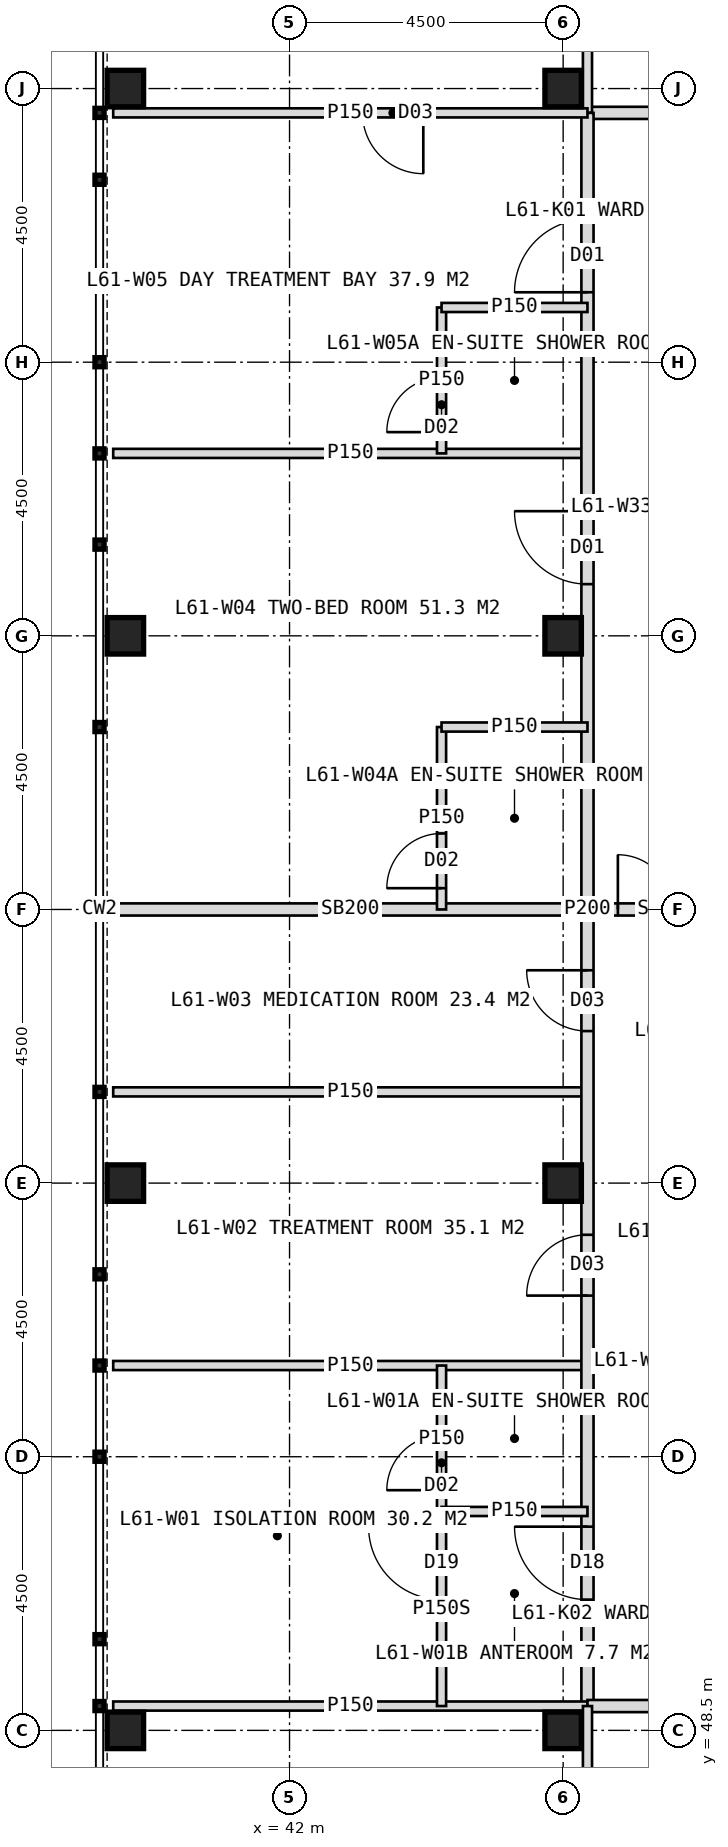
"""IFC4 building model, lengths in metres.
Left out: names, types, materials, properties, quantities, classifications, styles, units other than length and angle.
Written with IfcOpenShell. Run it as: python <this file> out.ifc"""

import sys

from ifc_helpers import new_model, si_unit, direction, frame, frame_2d, origin, origin_2d, place, context, subcontext, project, spatial, rectangle, hollow_rectangle, extrude, element, fill, save


model = new_model("IFC4")
c1 = context("Model", 3, precision=1e-05, world=origin(), true_north=direction((0.0, 1.0)))
c2 = subcontext(c1, "Body", "Model", "MODEL_VIEW")
j1 = project(units=[si_unit("LENGTHUNIT", "METRE"), si_unit("PLANEANGLEUNIT", "RADIAN")], contexts=[c1])
p1 = place(None, origin())
s1 = spatial("IfcSite", under=j1, at=p1, CompositionType="ELEMENT")
p2 = place(p1, origin())
s2 = spatial("IfcBuilding", under=s1, at=p2, CompositionType="ELEMENT")
p3 = place(p2, frame((0.0, 0.0, 254.0)))
s3 = spatial("IfcBuildingStorey", under=s2, at=p3, CompositionType="ELEMENT", Elevation=254.0)
for number, where, z_axis, x_axis in (
    (1, (46.5, 48.5, 0.0), (0.0, 0.0, 1.0), (1.0, 0.0, 0.0)),
    (2, (46.5, 75.5, 0.0), (0.0, 0.0, 1.0), (1.0, 0.0, 0.0)),
    (3, (46.5, 57.5, 0.0), (0.0, 0.0, 1.0), (1.0, 0.0, 0.0)),
    (4, (46.5, 66.5, 0.0), (0.0, 0.0, 1.0), (1.0, 0.0, 0.0)),
    (5, (39.3, 48.5, 0.0), (0.0, 0.0, 1.0), (1.0, 0.0, 0.0)),
    (6, (39.3, 57.5, 0.0), (0.0, 0.0, 1.0), (1.0, 0.0, 0.0)),
    (7, (39.3, 66.5, 0.0), (0.0, 0.0, 1.0), (1.0, 0.0, 0.0)),
    (8, (39.3, 75.5, 0.0), (0.0, 0.0, 1.0), (1.0, 0.0, 0.0)),
):
    element("IfcColumn", number, at=place(p3, frame(where, z_axis=z_axis, x_axis=x_axis)), inside=s3, PredefinedType="COLUMN", context=c2, shape_type="SweptSolid", body=[
        extrude(hollow_rectangle(XDim=0.6, YDim=0.6, WallThickness=0.04, at=origin_2d()), origin(), (0.0, 0.0, 1.0), 4.0),
    ])
p4 = place(p3, frame((46.9, 75.1, 0.0), z_axis=(0.0, 0.0, 1.0), x_axis=(1.0, 0.0, 0.0)))
e9 = element("IfcWall", 9, at=p4, inside=s3, PredefinedType="PARTITIONING", context=c2, shape_type="SweptSolid", body=[
    extrude(rectangle(XDim=26.2, YDim=0.2, at=frame_2d((13.1, 0.0))), origin(), (0.0, 0.0, 1.0), 3.75),
])
p5 = place(p4, frame((1.75, 0.0, 0.0)))
e10 = element("IfcOpeningElement", 10, at=p5, cuts=e9, PredefinedType="OPENING", context=c2, shape_type="SweptSolid", body=[
    extrude(rectangle(XDim=1.2, YDim=2.2, at=frame_2d((0.6, 1.1))), frame((0.0, 0.11, 0.0), z_axis=(0.0, -1.0, 0.0), x_axis=(1.0, 0.0, 0.0)), (0.0, 0.0, 1.0), 0.22),
])
p6 = place(p4, frame((6.75, 0.0, 0.0)))
e11 = element("IfcOpeningElement", 11, at=p6, cuts=e9, PredefinedType="OPENING", context=c2, shape_type="SweptSolid", body=[
    extrude(rectangle(XDim=1.0, YDim=2.1, at=frame_2d((0.5, 1.05))), frame((0.0, 0.11, 0.0), z_axis=(0.0, -1.0, 0.0), x_axis=(1.0, 0.0, 0.0)), (0.0, 0.0, 1.0), 0.22),
])
p7 = place(p4, frame((12.75, 0.0, 0.0)))
e12 = element("IfcOpeningElement", 12, at=p7, cuts=e9, PredefinedType="OPENING", context=c2, shape_type="SweptSolid", body=[
    extrude(rectangle(XDim=1.2, YDim=2.2, at=frame_2d((0.6, 1.1))), frame((0.0, 0.11, 0.0), z_axis=(0.0, -1.0, 0.0), x_axis=(1.0, 0.0, 0.0)), (0.0, 0.0, 1.0), 0.22),
])
p8 = place(p4, frame((20.45, 0.0, 0.0)))
e13 = element("IfcOpeningElement", 13, at=p8, cuts=e9, PredefinedType="OPENING", context=c2, shape_type="SweptSolid", body=[
    extrude(rectangle(XDim=0.9, YDim=2.1, at=frame_2d((0.45, 1.05))), frame((0.0, 0.11, 0.0), z_axis=(0.0, -1.0, 0.0), x_axis=(1.0, 0.0, 0.0)), (0.0, 0.0, 1.0), 0.22),
])
p9 = place(p4, frame((18.45, 0.0, 0.0)))
e14 = element("IfcOpeningElement", 14, at=p9, cuts=e9, PredefinedType="OPENING", context=c2, shape_type="SweptSolid", body=[
    extrude(rectangle(XDim=1.0, YDim=2.1, at=frame_2d((0.5, 1.05))), frame((0.0, 0.11, 0.0), z_axis=(0.0, -1.0, 0.0), x_axis=(1.0, 0.0, 0.0)), (0.0, 0.0, 1.0), 0.22),
])
p10 = place(p4, frame((23.65, 0.0, 0.0)))
e15 = element("IfcOpeningElement", 15, at=p10, cuts=e9, PredefinedType="OPENING", context=c2, shape_type="SweptSolid", body=[
    extrude(rectangle(XDim=1.0, YDim=2.1, at=frame_2d((0.5, 1.05))), frame((0.0, 0.11, 0.0), z_axis=(0.0, -1.0, 0.0), x_axis=(1.0, 0.0, 0.0)), (0.0, 0.0, 1.0), 0.22),
])
for number, where, z_axis, x_axis in (
    (16, (46.9, 75.1, 0.0), (0.0, 0.0, 1.0), (0.0, 1.0, 0.0)),
    (17, (46.9, 54.5, 0.0), (0.0, 0.0, 1.0), (-1.0, 0.0, 0.0)),
    (18, (46.9, 59.0, 0.0), (0.0, 0.0, 1.0), (-1.0, 0.0, 0.0)),
):
    element("IfcWall", number, at=place(p3, frame(where, z_axis=z_axis, x_axis=x_axis)), inside=s3, PredefinedType="PARTITIONING", context=c2, shape_type="SweptSolid", body=[
        extrude(rectangle(XDim=7.8, YDim=0.15, at=frame_2d((3.9, 0.0))), origin(), (0.0, 0.0, 1.0), 3.75),
    ])
p11 = place(p3, frame((46.9, 62.0, 0.0), z_axis=(0.0, 0.0, 1.0), x_axis=(-1.0, 0.0, 0.0)))
e19 = element("IfcWall", 19, at=p11, inside=s3, PredefinedType="SOLIDWALL", context=c2, shape_type="SweptSolid", body=[
    extrude(rectangle(XDim=7.8, YDim=0.2, at=frame_2d((3.9, 0.0))), origin(), (0.0, 0.0, 1.0), 2.75),
])
p12 = place(p3, frame((46.9, 69.5, 0.0), z_axis=(0.0, 0.0, 1.0), x_axis=(-1.0, 0.0, 0.0)))
e20 = element("IfcWall", 20, at=p12, inside=s3, PredefinedType="PARTITIONING", context=c2, shape_type="SweptSolid", body=[
    extrude(rectangle(XDim=7.8, YDim=0.15, at=frame_2d((3.9, 0.0))), origin(), (0.0, 0.0, 1.0), 3.75),
])
p13 = place(p3, frame((46.9, 48.9, 0.0), z_axis=(0.0, 0.0, 1.0), x_axis=(0.0, 1.0, 0.0)))
e21 = element("IfcWall", 21, at=p13, inside=s3, PredefinedType="PARTITIONING", context=c2, shape_type="SweptSolid", body=[
    extrude(rectangle(XDim=26.2, YDim=0.2, at=frame_2d((13.1, 0.0))), origin(), (0.0, 0.0, 1.0), 3.75),
])
p14 = place(p13, frame((1.75, 0.0, 0.0)))
e22 = element("IfcOpeningElement", 22, at=p14, cuts=e21, PredefinedType="OPENING", context=c2, shape_type="SweptSolid", body=[
    extrude(rectangle(XDim=1.2, YDim=2.2, at=frame_2d((0.6, 1.1))), frame((0.0, 0.11, 0.0), z_axis=(0.0, -1.0, 0.0), x_axis=(1.0, 0.0, 0.0)), (0.0, 0.0, 1.0), 0.22),
])
p15 = place(p13, frame((6.75, 0.0, 0.0)))
e23 = element("IfcOpeningElement", 23, at=p15, cuts=e21, PredefinedType="OPENING", context=c2, shape_type="SweptSolid", body=[
    extrude(rectangle(XDim=1.0, YDim=2.1, at=frame_2d((0.5, 1.05))), frame((0.0, 0.11, 0.0), z_axis=(0.0, -1.0, 0.0), x_axis=(1.0, 0.0, 0.0)), (0.0, 0.0, 1.0), 0.22),
])
p16 = place(p13, frame((11.1, 0.0, 0.0)))
e24 = element("IfcOpeningElement", 24, at=p16, cuts=e21, PredefinedType="OPENING", context=c2, shape_type="SweptSolid", body=[
    extrude(rectangle(XDim=1.0, YDim=2.1, at=frame_2d((0.5, 1.05))), frame((0.0, 0.11, 0.0), z_axis=(0.0, -1.0, 0.0), x_axis=(1.0, 0.0, 0.0)), (0.0, 0.0, 1.0), 0.22),
])
p17 = place(p13, frame((18.45, 0.0, 0.0)))
e25 = element("IfcOpeningElement", 25, at=p17, cuts=e21, PredefinedType="OPENING", context=c2, shape_type="SweptSolid", body=[
    extrude(rectangle(XDim=1.2, YDim=2.2, at=frame_2d((0.6, 1.1))), frame((0.0, 0.11, 0.0), z_axis=(0.0, -1.0, 0.0), x_axis=(1.0, 0.0, 0.0)), (0.0, 0.0, 1.0), 0.22),
])
p18 = place(p13, frame((23.25, 0.0, 0.0)))
e26 = element("IfcOpeningElement", 26, at=p18, cuts=e21, PredefinedType="OPENING", context=c2, shape_type="SweptSolid", body=[
    extrude(rectangle(XDim=1.2, YDim=2.2, at=frame_2d((0.6, 1.1))), frame((0.0, 0.11, 0.0), z_axis=(0.0, -1.0, 0.0), x_axis=(1.0, 0.0, 0.0)), (0.0, 0.0, 1.0), 0.22),
])
p19 = place(p3, frame((46.9, 48.9, 0.0), z_axis=(0.0, 0.0, 1.0), x_axis=(-1.0, 0.0, 0.0)))
e27 = element("IfcWall", 27, at=p19, inside=s3, PredefinedType="PARTITIONING", context=c2, shape_type="SweptSolid", body=[
    extrude(rectangle(XDim=7.8, YDim=0.15, at=frame_2d((3.9, 0.0))), origin(), (0.0, 0.0, 1.0), 3.75),
])
p20 = place(p3, frame((44.5, 52.1, 0.0), z_axis=(0.0, 0.0, 1.0), x_axis=(0.0, 1.0, 0.0)))
e28 = element("IfcWall", 28, at=p20, inside=s3, PredefinedType="PARTITIONING", context=c2, shape_type="SweptSolid", body=[
    extrude(rectangle(XDim=2.4, YDim=0.15, at=frame_2d((1.2, 0.0))), origin(), (0.0, 0.0, 1.0), 3.75),
])
p21 = place(p20, frame((0.35, 0.0, 0.0)))
e29 = element("IfcOpeningElement", 29, at=p21, cuts=e28, PredefinedType="OPENING", context=c2, shape_type="SweptSolid", body=[
    extrude(rectangle(XDim=0.9, YDim=2.1, at=frame_2d((0.45, 1.05))), frame((0.0, 0.085, 0.0), z_axis=(0.0, -1.0, 0.0), x_axis=(1.0, 0.0, 0.0)), (0.0, 0.0, 1.0), 0.17),
])
p22 = place(p3, frame((46.9, 52.1, 0.0), z_axis=(0.0, 0.0, 1.0), x_axis=(-1.0, 0.0, 0.0)))
e30 = element("IfcWall", 30, at=p22, inside=s3, PredefinedType="PARTITIONING", context=c2, shape_type="SweptSolid", body=[
    extrude(rectangle(XDim=2.4, YDim=0.15, at=frame_2d((1.2, 0.0))), origin(), (0.0, 0.0, 1.0), 3.75),
])
p23 = place(p3, frame((44.5, 48.9, 0.0), z_axis=(0.0, 0.0, 1.0), x_axis=(0.0, 1.0, 0.0)))
e31 = element("IfcWall", 31, at=p23, inside=s3, PredefinedType="PARTITIONING", context=c2, shape_type="SweptSolid", body=[
    extrude(rectangle(XDim=3.2, YDim=0.15, at=frame_2d((1.6, 0.0))), origin(), (0.0, 0.0, 1.0), 3.75),
])
p24 = place(p23, frame((1.75, 0.0, 0.0)))
e32 = element("IfcOpeningElement", 32, at=p24, cuts=e31, PredefinedType="OPENING", context=c2, shape_type="SweptSolid", body=[
    extrude(rectangle(XDim=1.2, YDim=2.2, at=frame_2d((0.6, 1.1))), frame((0.0, 0.085, 0.0), z_axis=(0.0, -1.0, 0.0), x_axis=(1.0, 0.0, 0.0)), (0.0, 0.0, 1.0), 0.17),
])
p25 = place(p3, frame((44.5, 62.0, 0.0), z_axis=(0.0, 0.0, 1.0), x_axis=(0.0, 1.0, 0.0)))
e33 = element("IfcWall", 33, at=p25, inside=s3, PredefinedType="PARTITIONING", context=c2, shape_type="SweptSolid", body=[
    extrude(rectangle(XDim=3.0, YDim=0.15, at=frame_2d((1.5, 0.0))), origin(), (0.0, 0.0, 1.0), 3.75),
])
p26 = place(p25, frame((0.35, 0.0, 0.0)))
e34 = element("IfcOpeningElement", 34, at=p26, cuts=e33, PredefinedType="OPENING", context=c2, shape_type="SweptSolid", body=[
    extrude(rectangle(XDim=0.9, YDim=2.1, at=frame_2d((0.45, 1.05))), frame((0.0, 0.085, 0.0), z_axis=(0.0, -1.0, 0.0), x_axis=(1.0, 0.0, 0.0)), (0.0, 0.0, 1.0), 0.17),
])
p27 = place(p3, frame((46.9, 65.0, 0.0), z_axis=(0.0, 0.0, 1.0), x_axis=(-1.0, 0.0, 0.0)))
e35 = element("IfcWall", 35, at=p27, inside=s3, PredefinedType="PARTITIONING", context=c2, shape_type="SweptSolid", body=[
    extrude(rectangle(XDim=2.4, YDim=0.15, at=frame_2d((1.2, 0.0))), origin(), (0.0, 0.0, 1.0), 3.75),
])
p28 = place(p3, frame((46.9, 75.1, 0.0), z_axis=(0.0, 0.0, 1.0), x_axis=(-1.0, 0.0, 0.0)))
e36 = element("IfcWall", 36, at=p28, inside=s3, PredefinedType="PARTITIONING", context=c2, shape_type="SweptSolid", body=[
    extrude(rectangle(XDim=7.8, YDim=0.15, at=frame_2d((3.9, 0.0))), origin(), (0.0, 0.0, 1.0), 3.75),
])
p29 = place(p28, frame((2.7, 0.0, 0.0)))
e37 = element("IfcOpeningElement", 37, at=p29, cuts=e36, PredefinedType="OPENING", context=c2, shape_type="SweptSolid", body=[
    extrude(rectangle(XDim=1.0, YDim=2.1, at=frame_2d((0.5, 1.05))), frame((0.0, 0.085, 0.0), z_axis=(0.0, -1.0, 0.0), x_axis=(1.0, 0.0, 0.0)), (0.0, 0.0, 1.0), 0.17),
])
p30 = place(p3, frame((44.5, 69.5, 0.0), z_axis=(0.0, 0.0, 1.0), x_axis=(0.0, 1.0, 0.0)))
e38 = element("IfcWall", 38, at=p30, inside=s3, PredefinedType="PARTITIONING", context=c2, shape_type="SweptSolid", body=[
    extrude(rectangle(XDim=2.4, YDim=0.15, at=frame_2d((1.2, 0.0))), origin(), (0.0, 0.0, 1.0), 3.75),
])
p31 = place(p30, frame((0.35, 0.0, 0.0)))
e39 = element("IfcOpeningElement", 39, at=p31, cuts=e38, PredefinedType="OPENING", context=c2, shape_type="SweptSolid", body=[
    extrude(rectangle(XDim=0.9, YDim=2.1, at=frame_2d((0.45, 1.05))), frame((0.0, 0.085, 0.0), z_axis=(0.0, -1.0, 0.0), x_axis=(1.0, 0.0, 0.0)), (0.0, 0.0, 1.0), 0.17),
])
p32 = place(p3, frame((46.9, 71.9, 0.0), z_axis=(0.0, 0.0, 1.0), x_axis=(-1.0, 0.0, 0.0)))
e40 = element("IfcWall", 40, at=p32, inside=s3, PredefinedType="PARTITIONING", context=c2, shape_type="SweptSolid", body=[
    extrude(rectangle(XDim=2.4, YDim=0.15, at=frame_2d((1.2, 0.0))), origin(), (0.0, 0.0, 1.0), 3.75),
])
p33 = place(p3, frame((73.1, 48.9, 0.0), z_axis=(0.0, 0.0, 1.0), x_axis=(-1.0, 0.0, 0.0)))
e41 = element("IfcWall", 41, at=p33, inside=s3, PredefinedType="PARTITIONING", context=c2, shape_type="SweptSolid", body=[
    extrude(rectangle(XDim=26.2, YDim=0.2, at=frame_2d((13.1, 0.0))), origin(), (0.0, 0.0, 1.0), 3.75),
])
p34 = place(p33, frame((1.75, 0.0, 0.0)))
e42 = element("IfcOpeningElement", 42, at=p34, cuts=e41, PredefinedType="OPENING", context=c2, shape_type="SweptSolid", body=[
    extrude(rectangle(XDim=1.2, YDim=2.2, at=frame_2d((0.6, 1.1))), frame((0.0, 0.11, 0.0), z_axis=(0.0, -1.0, 0.0), x_axis=(1.0, 0.0, 0.0)), (0.0, 0.0, 1.0), 0.22),
])
p35 = place(p33, frame((6.75, 0.0, 0.0)))
e43 = element("IfcOpeningElement", 43, at=p35, cuts=e41, PredefinedType="OPENING", context=c2, shape_type="SweptSolid", body=[
    extrude(rectangle(XDim=1.0, YDim=2.1, at=frame_2d((0.5, 1.05))), frame((0.0, 0.11, 0.0), z_axis=(0.0, -1.0, 0.0), x_axis=(1.0, 0.0, 0.0)), (0.0, 0.0, 1.0), 0.22),
])
p36 = place(p33, frame((11.1, 0.0, 0.0)))
e44 = element("IfcOpeningElement", 44, at=p36, cuts=e41, PredefinedType="OPENING", context=c2, shape_type="SweptSolid", body=[
    extrude(rectangle(XDim=1.0, YDim=2.1, at=frame_2d((0.5, 1.05))), frame((0.0, 0.11, 0.0), z_axis=(0.0, -1.0, 0.0), x_axis=(1.0, 0.0, 0.0)), (0.0, 0.0, 1.0), 0.22),
])
p37 = place(p33, frame((14.1, 0.0, 0.0)))
e45 = element("IfcOpeningElement", 45, at=p37, cuts=e41, PredefinedType="OPENING", context=c2, shape_type="SweptSolid", body=[
    extrude(rectangle(XDim=1.0, YDim=2.1, at=frame_2d((0.5, 1.05))), frame((0.0, 0.11, 0.0), z_axis=(0.0, -1.0, 0.0), x_axis=(1.0, 0.0, 0.0)), (0.0, 0.0, 1.0), 0.22),
])
p38 = place(p33, frame((18.45, 0.0, 0.0)))
e46 = element("IfcOpeningElement", 46, at=p38, cuts=e41, PredefinedType="OPENING", context=c2, shape_type="SweptSolid", body=[
    extrude(rectangle(XDim=1.0, YDim=2.1, at=frame_2d((0.5, 1.05))), frame((0.0, 0.11, 0.0), z_axis=(0.0, -1.0, 0.0), x_axis=(1.0, 0.0, 0.0)), (0.0, 0.0, 1.0), 0.22),
])
p39 = place(p33, frame((22.9, 0.0, 0.0)))
e47 = element("IfcOpeningElement", 47, at=p39, cuts=e41, PredefinedType="OPENING", context=c2, shape_type="SweptSolid", body=[
    extrude(rectangle(XDim=1.0, YDim=2.1, at=frame_2d((0.5, 1.05))), frame((0.0, 0.11, 0.0), z_axis=(0.0, -1.0, 0.0), x_axis=(1.0, 0.0, 0.0)), (0.0, 0.0, 1.0), 0.22),
])
p40 = place(p3, frame((46.9, 48.9, 0.0), z_axis=(0.0, 0.0, 1.0), x_axis=(0.0, -1.0, 0.0)))
e48 = element("IfcWall", 48, at=p40, inside=s3, PredefinedType="PARTITIONING", context=c2, shape_type="SweptSolid", body=[
    extrude(rectangle(XDim=7.8, YDim=0.15, at=frame_2d((3.9, 0.0))), origin(), (0.0, 0.0, 1.0), 3.75),
])
p41 = place(p40, frame((2.7, 0.0, 0.0)))
e49 = element("IfcOpeningElement", 49, at=p41, cuts=e48, PredefinedType="OPENING", context=c2, shape_type="SweptSolid", body=[
    extrude(rectangle(XDim=1.0, YDim=2.1, at=frame_2d((0.5, 1.05))), frame((0.0, 0.085, 0.0), z_axis=(0.0, -1.0, 0.0), x_axis=(1.0, 0.0, 0.0)), (0.0, 0.0, 1.0), 0.17),
])
p42 = place(p3, frame((49.5, 62.0, 0.0), z_axis=(0.0, 0.0, 1.0), x_axis=(-1.0, 0.0, 0.0)))
e50 = element("IfcWall", 50, at=p42, inside=s3, PredefinedType="SOLIDWALL", context=c2, shape_type="SweptSolid", body=[
    extrude(rectangle(XDim=2.6, YDim=0.2, at=frame_2d((1.3, 0.0))), origin(), (0.0, 0.0, 1.0), 2.75),
])
p43 = place(p42, frame((0.3, 0.0, 0.0)))
e51 = element("IfcOpeningElement", 51, at=p43, cuts=e50, PredefinedType="OPENING", context=c2, shape_type="SweptSolid", body=[
    extrude(rectangle(XDim=1.8, YDim=2.2, at=frame_2d((0.9, 1.1))), frame((0.0, 0.11, 0.0), z_axis=(0.0, -1.0, 0.0), x_axis=(1.0, 0.0, 0.0)), (0.0, 0.0, 1.0), 0.22),
])
p44 = place(p24, origin())
e52 = element("IfcDoor", 52, at=p44, inside=s3, OperationType="SINGLE_SWING_RIGHT", PredefinedType="DOOR", context=c2, shape_type="SweptSolid", body=[
    extrude(rectangle(XDim=1.2, YDim=2.2, at=frame_2d((0.6, 1.1))), frame((0.0, 0.025, 0.0), z_axis=(0.0, -1.0, 0.0), x_axis=(1.0, 0.0, 0.0)), (0.0, 0.0, 1.0), 0.05),
])
fill(e32, e52)
p45 = place(p14, origin())
e53 = element("IfcDoor", 53, at=p45, inside=s3, OperationType="SINGLE_SWING_RIGHT", PredefinedType="DOOR", context=c2, shape_type="SweptSolid", body=[
    extrude(rectangle(XDim=1.2, YDim=2.2, at=frame_2d((0.6, 1.1))), frame((0.0, 0.025, 0.0), z_axis=(0.0, -1.0, 0.0), x_axis=(1.0, 0.0, 0.0)), (0.0, 0.0, 1.0), 0.05),
])
fill(e22, e53)
p46 = place(p21, origin())
e54 = element("IfcDoor", 54, at=p46, inside=s3, OperationType="SINGLE_SWING_LEFT", PredefinedType="DOOR", context=c2, shape_type="SweptSolid", body=[
    extrude(rectangle(XDim=0.9, YDim=2.1, at=frame_2d((0.45, 1.05))), frame((0.0, 0.025, 0.0), z_axis=(0.0, -1.0, 0.0), x_axis=(1.0, 0.0, 0.0)), (0.0, 0.0, 1.0), 0.05),
])
fill(e29, e54)
p47 = place(p15, origin())
e55 = element("IfcDoor", 55, at=p47, inside=s3, OperationType="SINGLE_SWING_LEFT", PredefinedType="DOOR", context=c2, shape_type="SweptSolid", body=[
    extrude(rectangle(XDim=1.0, YDim=2.1, at=frame_2d((0.5, 1.05))), frame((0.0, 0.025, 0.0), z_axis=(0.0, -1.0, 0.0), x_axis=(1.0, 0.0, 0.0)), (0.0, 0.0, 1.0), 0.05),
])
fill(e23, e55)
p48 = place(p16, origin())
e56 = element("IfcDoor", 56, at=p48, inside=s3, OperationType="SINGLE_SWING_RIGHT", PredefinedType="DOOR", context=c2, shape_type="SweptSolid", body=[
    extrude(rectangle(XDim=1.0, YDim=2.1, at=frame_2d((0.5, 1.05))), frame((0.0, 0.025, 0.0), z_axis=(0.0, -1.0, 0.0), x_axis=(1.0, 0.0, 0.0)), (0.0, 0.0, 1.0), 0.05),
])
fill(e24, e56)
p49 = place(p17, origin())
e57 = element("IfcDoor", 57, at=p49, inside=s3, OperationType="SINGLE_SWING_RIGHT", PredefinedType="DOOR", context=c2, shape_type="SweptSolid", body=[
    extrude(rectangle(XDim=1.2, YDim=2.2, at=frame_2d((0.6, 1.1))), frame((0.0, 0.025, 0.0), z_axis=(0.0, -1.0, 0.0), x_axis=(1.0, 0.0, 0.0)), (0.0, 0.0, 1.0), 0.05),
])
fill(e25, e57)
p50 = place(p26, origin())
e58 = element("IfcDoor", 58, at=p50, inside=s3, OperationType="SINGLE_SWING_LEFT", PredefinedType="DOOR", context=c2, shape_type="SweptSolid", body=[
    extrude(rectangle(XDim=0.9, YDim=2.1, at=frame_2d((0.45, 1.05))), frame((0.0, 0.025, 0.0), z_axis=(0.0, -1.0, 0.0), x_axis=(1.0, 0.0, 0.0)), (0.0, 0.0, 1.0), 0.05),
])
fill(e34, e58)
p51 = place(p29, origin())
e59 = element("IfcDoor", 59, at=p51, inside=s3, OperationType="SINGLE_SWING_LEFT", PredefinedType="DOOR", context=c2, shape_type="SweptSolid", body=[
    extrude(rectangle(XDim=1.0, YDim=2.1, at=frame_2d((0.5, 1.05))), frame((0.0, 0.025, 0.0), z_axis=(0.0, -1.0, 0.0), x_axis=(1.0, 0.0, 0.0)), (0.0, 0.0, 1.0), 0.05),
])
fill(e37, e59)
p52 = place(p18, origin())
e60 = element("IfcDoor", 60, at=p52, inside=s3, OperationType="SINGLE_SWING_LEFT", PredefinedType="DOOR", context=c2, shape_type="SweptSolid", body=[
    extrude(rectangle(XDim=1.2, YDim=2.2, at=frame_2d((0.6, 1.1))), frame((0.0, 0.025, 0.0), z_axis=(0.0, -1.0, 0.0), x_axis=(1.0, 0.0, 0.0)), (0.0, 0.0, 1.0), 0.05),
])
fill(e26, e60)
p53 = place(p31, origin())
e61 = element("IfcDoor", 61, at=p53, inside=s3, OperationType="SINGLE_SWING_LEFT", PredefinedType="DOOR", context=c2, shape_type="SweptSolid", body=[
    extrude(rectangle(XDim=0.9, YDim=2.1, at=frame_2d((0.45, 1.05))), frame((0.0, 0.025, 0.0), z_axis=(0.0, -1.0, 0.0), x_axis=(1.0, 0.0, 0.0)), (0.0, 0.0, 1.0), 0.05),
])
fill(e39, e61)
p54 = place(p43, origin())
e62 = element("IfcDoor", 62, at=p54, inside=s3, OperationType="DOUBLE_DOOR_DOUBLE_SWING", PredefinedType="DOOR", context=c2, shape_type="SweptSolid", body=[
    extrude(rectangle(XDim=1.8, YDim=2.2, at=frame_2d((0.9, 1.1))), frame((0.0, 0.025, 0.0), z_axis=(0.0, -1.0, 0.0), x_axis=(1.0, 0.0, 0.0)), (0.0, 0.0, 1.0), 0.05),
])
fill(e51, e62)
save(model, sys.argv[1])
